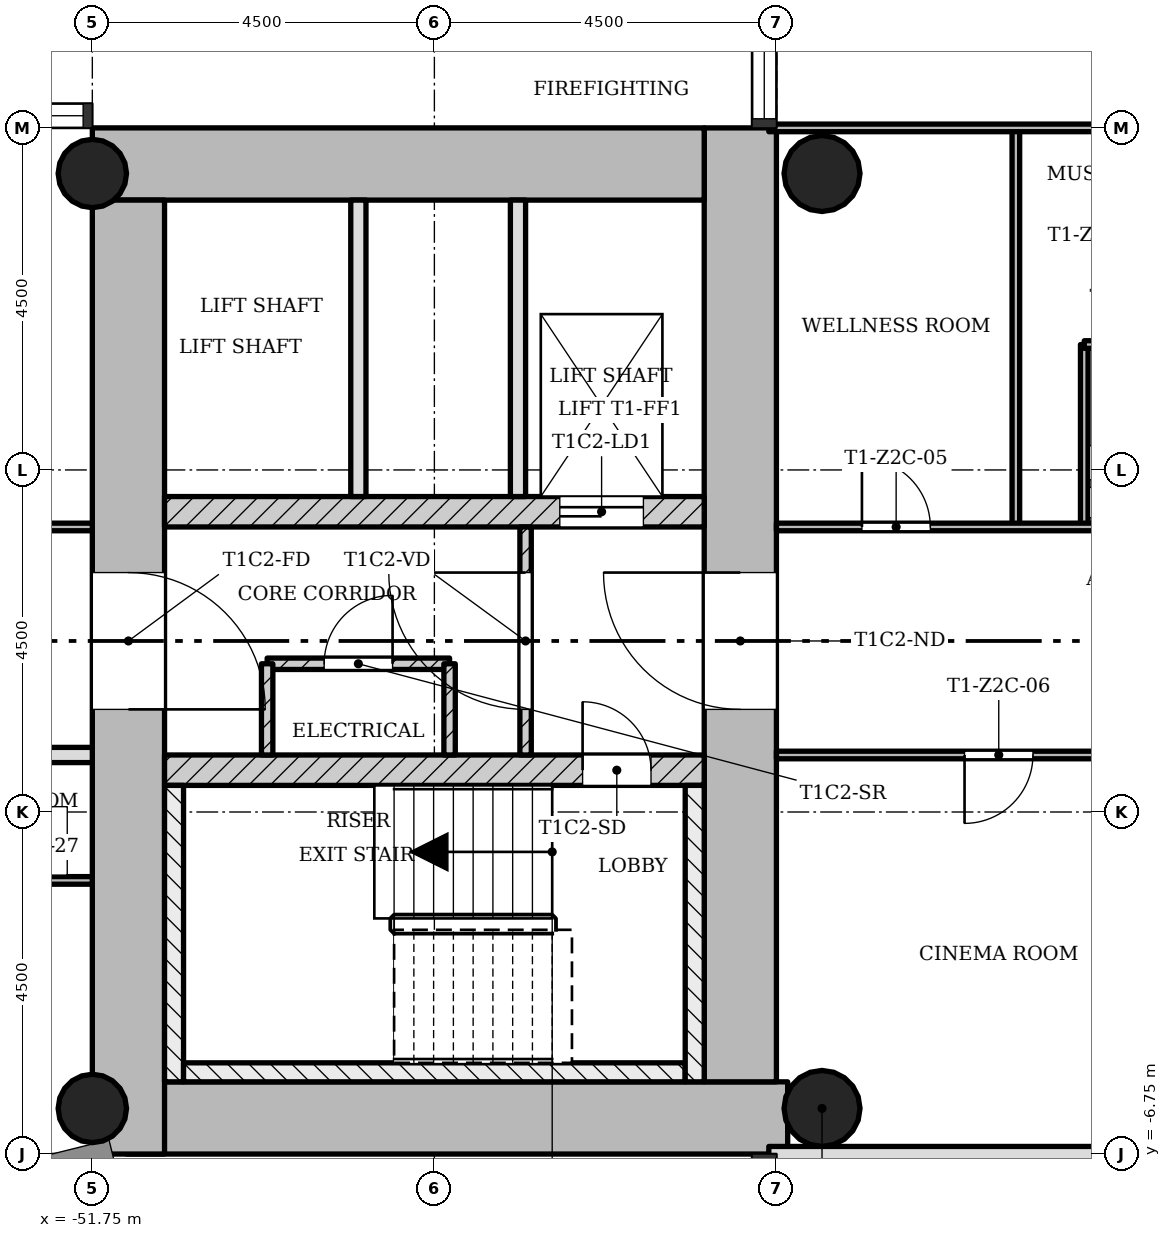
"""IFC4 building model, lengths in metres.
Left out: names, types, materials, properties, quantities, classifications, styles, units other than length and angle.
Written with IfcOpenShell. Run it as: python <this file> out.ifc"""

import sys

from ifc_helpers import new_model, si_unit, direction, frame, frame_2d, origin, origin_2d, place, context, subcontext, project, spatial, rectangle, hollow_circle, extrude, element, fill, save


model = new_model("IFC4")
c1 = context("Model", 3, precision=1e-05, world=origin(), true_north=direction((0.0, 1.0)))
c2 = subcontext(c1, "Body", "Model", "MODEL_VIEW")
j1 = project(units=[si_unit("LENGTHUNIT", "METRE"), si_unit("PLANEANGLEUNIT", "RADIAN")], contexts=[c1])
p1 = place(None, origin())
s1 = spatial("IfcSite", under=j1, at=p1, CompositionType="ELEMENT")
p2 = place(p1, origin())
s2 = spatial("IfcBuilding", under=s1, at=p2, CompositionType="ELEMENT")
p3 = place(p2, frame((0.0, 0.0, 93.6)))
s3 = spatial("IfcBuildingStorey", under=s2, at=p3, CompositionType="ELEMENT", Elevation=93.6)
p4 = place(p3, frame((-51.298, -6.275, 0.0), z_axis=(0.0, 0.0, 1.0), x_axis=(1.0, 0.0, 0.0)))
e1 = element("IfcWall", 1, at=p4, inside=s3, PredefinedType="SHEAR", context=c2, shape_type="SweptSolid", body=[
    extrude(rectangle(XDim=8.696, YDim=0.95, at=frame_2d((4.348, 0.0))), origin(), (0.0, 0.0, 1.0), 3.4),
])
p5 = place(p3, frame((-43.225, -5.8, 0.0), z_axis=(0.0, 0.0, 1.0), x_axis=(0.0, 1.0, 0.0)))
e2 = element("IfcWall", 2, at=p5, inside=s3, PredefinedType="SHEAR", context=c2, shape_type="SweptSolid", body=[
    extrude(rectangle(XDim=12.55, YDim=0.95, at=frame_2d((6.275, 0.0))), origin(), (0.0, 0.0, 1.0), 3.4),
])
p6 = place(p5, frame((4.9, 0.0, 0.0)))
e3 = element("IfcOpeningElement", 3, at=p6, cuts=e2, PredefinedType="OPENING", context=c2, shape_type="SweptSolid", body=[
    extrude(rectangle(XDim=1.8, YDim=2.1, at=frame_2d((0.9, 1.05))), frame((0.0, 0.485, 0.0), z_axis=(0.0, -1.0, 0.0), x_axis=(1.0, 0.0, 0.0)), (0.0, 0.0, 1.0), 0.97),
])
p7 = place(p3, frame((-43.7, 6.275, 0.0), z_axis=(0.0, 0.0, 1.0), x_axis=(-1.0, 0.0, 0.0)))
e4 = element("IfcWall", 4, at=p7, inside=s3, PredefinedType="SHEAR", context=c2, shape_type="SweptSolid", body=[
    extrude(rectangle(XDim=8.05, YDim=0.95, at=frame_2d((4.025, 0.0))), origin(), (0.0, 0.0, 1.0), 3.4),
])
p8 = place(p3, frame((-51.275, 5.8, 0.0), z_axis=(0.0, 0.0, 1.0), x_axis=(0.0, -1.0, 0.0)))
e5 = element("IfcWall", 5, at=p8, inside=s3, PredefinedType="SHEAR", context=c2, shape_type="SweptSolid", body=[
    extrude(rectangle(XDim=12.55, YDim=0.95, at=frame_2d((6.275, 0.0))), origin(), (0.0, 0.0, 1.0), 3.4),
])
p9 = place(p8, frame((4.9, 0.0, 0.0)))
e6 = element("IfcOpeningElement", 6, at=p9, cuts=e5, PredefinedType="OPENING", context=c2, shape_type="SweptSolid", body=[
    extrude(rectangle(XDim=1.8, YDim=2.1, at=frame_2d((0.9, 1.05))), frame((0.0, 0.485, 0.0), z_axis=(0.0, -1.0, 0.0), x_axis=(1.0, 0.0, 0.0)), (0.0, 0.0, 1.0), 0.97),
])
p10 = place(p3, frame((-50.8, -1.7, 0.0), z_axis=(0.0, 0.0, 1.0), x_axis=(1.0, 0.0, 0.0)))
e7 = element("IfcWall", 7, at=p10, inside=s3, PredefinedType="SHEAR", context=c2, shape_type="SweptSolid", body=[
    extrude(rectangle(XDim=7.1, YDim=0.4, at=frame_2d((3.55, 0.0))), origin(), (0.0, 0.0, 1.0), 3.4),
])
p11 = place(p10, frame((5.5, 0.0, 0.0)))
e8 = element("IfcOpeningElement", 8, at=p11, cuts=e7, PredefinedType="OPENING", context=c2, shape_type="SweptSolid", body=[
    extrude(rectangle(XDim=0.9, YDim=2.1, at=frame_2d((0.45, 1.05))), frame((0.0, 0.21, 0.0), z_axis=(0.0, -1.0, 0.0), x_axis=(1.0, 0.0, 0.0)), (0.0, 0.0, 1.0), 0.42),
])
p12 = place(p3, frame((-50.8, 1.7, 0.0), z_axis=(0.0, 0.0, 1.0), x_axis=(1.0, 0.0, 0.0)))
e9 = element("IfcWall", 9, at=p12, inside=s3, PredefinedType="SHEAR", context=c2, shape_type="SweptSolid", body=[
    extrude(rectangle(XDim=7.1, YDim=0.4, at=frame_2d((3.55, 0.0))), origin(), (0.0, 0.0, 1.0), 3.4),
])
p13 = place(p12, frame((5.2, 0.0, 0.0)))
e10 = element("IfcOpeningElement", 10, at=p13, cuts=e9, PredefinedType="OPENING", context=c2, shape_type="SweptSolid", body=[
    extrude(rectangle(XDim=1.1, YDim=2.1, at=frame_2d((0.55, 1.05))), frame((0.0, 0.21, 0.0), z_axis=(0.0, -1.0, 0.0), x_axis=(1.0, 0.0, 0.0)), (0.0, 0.0, 1.0), 0.42),
])
for number, where, z_axis, x_axis in (
    (11, (-51.75, -6.15, 0.0), (0.0, 0.0, 1.0), (1.0, 0.0, 0.0)),
    (12, (-51.75, 6.15, 0.0), (0.0, 0.0, 1.0), (1.0, 0.0, 0.0)),
):
    element("IfcColumn", number, at=place(p3, frame(where, z_axis=z_axis, x_axis=x_axis)), inside=s3, PredefinedType="COLUMN", context=c2, shape_type="SweptSolid", body=[
        extrude(hollow_circle(Radius=0.45, WallThickness=0.032, at=origin_2d()), origin(), (0.0, 0.0, 1.0), 3.4),
    ])
for number, where, z_axis, x_axis in (
    (13, (-42.15, -6.15, 0.0), (0.0, 0.0, 1.0), (1.0, 0.0, 0.0)),
    (14, (-42.15, 6.15, 0.0), (0.0, 0.0, 1.0), (1.0, 0.0, 0.0)),
):
    element("IfcColumn", number, at=place(p3, frame(where, z_axis=z_axis, x_axis=x_axis)), inside=s3, PredefinedType="COLUMN", context=c2, shape_type="SweptSolid", body=[
        extrude(hollow_circle(Radius=0.5, WallThickness=0.036, at=origin_2d()), origin(), (0.0, 0.0, 1.0), 3.4),
    ])
p14 = place(p3, frame((-46.05, 1.5, 0.0), z_axis=(0.0, 0.0, 1.0), x_axis=(0.0, -1.0, 0.0)))
e15 = element("IfcWall", 15, at=p14, inside=s3, PredefinedType="PARTITIONING", context=c2, shape_type="SweptSolid", body=[
    extrude(rectangle(XDim=3.0, YDim=0.15, at=frame_2d((1.5, 0.0))), origin(), (0.0, 0.0, 1.0), 3.0),
])
p15 = place(p14, frame((0.6, 0.0, 0.0)))
e16 = element("IfcOpeningElement", 16, at=p15, cuts=e15, PredefinedType="OPENING", context=c2, shape_type="SweptSolid", body=[
    extrude(rectangle(XDim=1.8, YDim=2.1, at=frame_2d((0.9, 1.05))), frame((0.0, 0.085, 0.0), z_axis=(0.0, -1.0, 0.0), x_axis=(1.0, 0.0, 0.0)), (0.0, 0.0, 1.0), 0.17),
])
for number, where, z_axis, x_axis in (
    (17, (-46.15, 5.8, 0.0), (0.0, 0.0, 1.0), (0.0, -1.0, 0.0)),
    (18, (-48.25, 5.8, 0.0), (0.0, 0.0, 1.0), (0.0, -1.0, 0.0)),
):
    element("IfcWall", number, at=place(p3, frame(where, z_axis=z_axis, x_axis=x_axis)), inside=s3, PredefinedType="SOLIDWALL", context=c2, shape_type="SweptSolid", body=[
        extrude(rectangle(XDim=3.9, YDim=0.2, at=frame_2d((1.95, 0.0))), origin(), (0.0, 0.0, 1.0), 3.0),
    ])
p16 = place(p3, frame((-47.05, -0.3, 0.0), z_axis=(0.0, 0.0, 1.0), x_axis=(-1.0, 0.0, 0.0)))
e19 = element("IfcWall", 19, at=p16, inside=s3, PredefinedType="PARTITIONING", context=c2, shape_type="SweptSolid", body=[
    extrude(rectangle(XDim=2.4, YDim=0.15, at=frame_2d((1.2, 0.0))), origin(), (0.0, 0.0, 1.0), 3.0),
])
p17 = place(p16, frame((0.75, 0.0, 0.0)))
e20 = element("IfcOpeningElement", 20, at=p17, cuts=e19, PredefinedType="OPENING", context=c2, shape_type="SweptSolid", body=[
    extrude(rectangle(XDim=0.9, YDim=2.1, at=frame_2d((0.45, 1.05))), frame((0.0, 0.085, 0.0), z_axis=(0.0, -1.0, 0.0), x_axis=(1.0, 0.0, 0.0)), (0.0, 0.0, 1.0), 0.17),
])
for number, where, z_axis, x_axis in (
    (21, (-47.05, -0.3, 0.0), (0.0, 0.0, 1.0), (0.0, -1.0, 0.0)),
    (22, (-49.45, -0.3, 0.0), (0.0, 0.0, 1.0), (0.0, -1.0, 0.0)),
):
    element("IfcWall", number, at=place(p3, frame(where, z_axis=z_axis, x_axis=x_axis)), inside=s3, PredefinedType="PARTITIONING", context=c2, shape_type="SweptSolid", body=[
        extrude(rectangle(XDim=1.2, YDim=0.15, at=frame_2d((0.6, 0.0))), origin(), (0.0, 0.0, 1.0), 3.0),
    ])
p18 = place(p3, frame((-39.6, 1.5, 0.0), z_axis=(0.0, 0.0, 1.0), x_axis=(0.0, 1.0, 0.0)))
e23 = element("IfcWall", 23, at=p18, inside=s3, PredefinedType="PARTITIONING", context=c2, shape_type="SweptSolid", body=[
    extrude(rectangle(XDim=5.25, YDim=0.1, at=frame_2d((2.625, 0.0))), origin(), (0.0, 0.0, 1.0), 3.0),
])
p19 = place(p3, frame((-38.7, 1.5, 0.0), z_axis=(0.0, 0.0, 1.0), x_axis=(0.0, 1.0, 0.0)))
e24 = element("IfcWall", 24, at=p19, inside=s3, PredefinedType="PARTITIONING", context=c2, shape_type="SweptSolid", body=[
    extrude(rectangle(XDim=2.4, YDim=0.1, at=frame_2d((1.2, 0.0))), origin(), (0.0, 0.0, 1.0), 3.0),
])
p20 = place(p3, frame((-42.85, -6.75, 0.0), z_axis=(0.0, 0.0, 1.0), x_axis=(1.0, 0.0, 0.0)))
e25 = element("IfcWall", 25, at=p20, inside=s3, PredefinedType="SOLIDWALL", context=c2, shape_type="SweptSolid", body=[
    extrude(rectangle(XDim=13.7, YDim=0.2, at=frame_2d((6.85, 0.0))), origin(), (0.0, 0.0, 1.0), 3.0),
])
p21 = place(p20, frame((6.4, 0.0, 0.0)))
e26 = element("IfcOpeningElement", 26, at=p21, cuts=e25, PredefinedType="OPENING", context=c2, shape_type="SweptSolid", body=[
    extrude(rectangle(XDim=0.9, YDim=2.1, at=frame_2d((0.45, 1.05))), frame((0.0, 0.11, 0.0), z_axis=(0.0, -1.0, 0.0), x_axis=(1.0, 0.0, 0.0)), (0.0, 0.0, 1.0), 0.22),
])
p22 = place(p3, frame((-56.25, -3.15, 0.0), z_axis=(0.0, 0.0, 1.0), x_axis=(1.0, 0.0, 0.0)))
e27 = element("IfcWall", 27, at=p22, inside=s3, PredefinedType="PARTITIONING", context=c2, shape_type="SweptSolid", body=[
    extrude(rectangle(XDim=4.5, YDim=0.1, at=frame_2d((2.25, 0.0))), origin(), (0.0, 0.0, 1.0), 3.0),
])
p23 = place(p22, frame((0.6, 0.0, 0.0)))
e28 = element("IfcOpeningElement", 28, at=p23, cuts=e27, PredefinedType="OPENING", context=c2, shape_type="SweptSolid", body=[
    extrude(rectangle(XDim=0.9, YDim=2.1, at=frame_2d((0.45, 1.05))), frame((0.0, 0.06, 0.0), z_axis=(0.0, -1.0, 0.0), x_axis=(1.0, 0.0, 0.0)), (0.0, 0.0, 1.0), 0.12),
])
p24 = place(p3, frame((-42.75, -1.5, 0.0), z_axis=(0.0, 0.0, 1.0), x_axis=(1.0, 0.0, 0.0)))
e29 = element("IfcWall", 29, at=p24, inside=s3, PredefinedType="PARTITIONING", context=c2, shape_type="SweptSolid", body=[
    extrude(rectangle(XDim=5.85, YDim=0.1, at=frame_2d((2.925, 0.0))), origin(), (0.0, 0.0, 1.0), 3.0),
])
p25 = place(p24, frame((2.475, 0.0, 0.0)))
e30 = element("IfcOpeningElement", 30, at=p25, cuts=e29, PredefinedType="OPENING", context=c2, shape_type="SweptSolid", body=[
    extrude(rectangle(XDim=0.9, YDim=2.1, at=frame_2d((0.45, 1.05))), frame((0.0, 0.06, 0.0), z_axis=(0.0, -1.0, 0.0), x_axis=(1.0, 0.0, 0.0)), (0.0, 0.0, 1.0), 0.12),
])
p26 = place(p3, frame((-56.25, -1.5, 0.0), z_axis=(0.0, 0.0, 1.0), x_axis=(1.0, 0.0, 0.0)))
e31 = element("IfcWall", 31, at=p26, inside=s3, PredefinedType="SOLIDWALL", context=c2, shape_type="SweptSolid", body=[
    extrude(rectangle(XDim=4.5, YDim=0.2, at=frame_2d((2.25, 0.0))), origin(), (0.0, 0.0, 1.0), 3.0),
])
p27 = place(p26, frame((0.6, 0.0, 0.0)))
e32 = element("IfcOpeningElement", 32, at=p27, cuts=e31, PredefinedType="OPENING", context=c2, shape_type="SweptSolid", body=[
    extrude(rectangle(XDim=0.9, YDim=2.1, at=frame_2d((0.45, 1.05))), frame((0.0, 0.11, 0.0), z_axis=(0.0, -1.0, 0.0), x_axis=(1.0, 0.0, 0.0)), (0.0, 0.0, 1.0), 0.22),
])
p28 = place(p3, frame((-56.25, 1.5, 0.0), z_axis=(0.0, 0.0, 1.0), x_axis=(1.0, 0.0, 0.0)))
e33 = element("IfcWall", 33, at=p28, inside=s3, PredefinedType="PARTITIONING", context=c2, shape_type="SweptSolid", body=[
    extrude(rectangle(XDim=4.5, YDim=0.1, at=frame_2d((2.25, 0.0))), origin(), (0.0, 0.0, 1.0), 3.0),
])
p29 = place(p28, frame((1.8, 0.0, 0.0)))
e34 = element("IfcOpeningElement", 34, at=p29, cuts=e33, PredefinedType="OPENING", context=c2, shape_type="SweptSolid", body=[
    extrude(rectangle(XDim=0.9, YDim=2.1, at=frame_2d((0.45, 1.05))), frame((0.0, 0.06, 0.0), z_axis=(0.0, -1.0, 0.0), x_axis=(1.0, 0.0, 0.0)), (0.0, 0.0, 1.0), 0.12),
])
p30 = place(p3, frame((-42.75, 1.5, 0.0), z_axis=(0.0, 0.0, 1.0), x_axis=(1.0, 0.0, 0.0)))
e35 = element("IfcWall", 35, at=p30, inside=s3, PredefinedType="PARTITIONING", context=c2, shape_type="SweptSolid", body=[
    extrude(rectangle(XDim=5.85, YDim=0.1, at=frame_2d((2.925, 0.0))), origin(), (0.0, 0.0, 1.0), 3.0),
])
p31 = place(p30, frame((1.125, 0.0, 0.0)))
e36 = element("IfcOpeningElement", 36, at=p31, cuts=e35, PredefinedType="OPENING", context=c2, shape_type="SweptSolid", body=[
    extrude(rectangle(XDim=0.9, YDim=2.1, at=frame_2d((0.45, 1.05))), frame((0.0, 0.06, 0.0), z_axis=(0.0, -1.0, 0.0), x_axis=(1.0, 0.0, 0.0)), (0.0, 0.0, 1.0), 0.12),
])
p32 = place(p3, frame((-38.7, 3.9, 0.0), z_axis=(0.0, 0.0, 1.0), x_axis=(1.0, 0.0, 0.0)))
e37 = element("IfcWall", 37, at=p32, inside=s3, PredefinedType="PARTITIONING", context=c2, shape_type="SweptSolid", body=[
    extrude(rectangle(XDim=1.8, YDim=0.1, at=frame_2d((0.9, 0.0))), origin(), (0.0, 0.0, 1.0), 3.0),
])
p33 = place(p3, frame((-42.85, 6.75, 0.0), z_axis=(0.0, 0.0, 1.0), x_axis=(1.0, 0.0, 0.0)))
e38 = element("IfcWall", 38, at=p33, inside=s3, PredefinedType="PARTITIONING", context=c2, shape_type="SweptSolid", body=[
    extrude(rectangle(XDim=5.95, YDim=0.1, at=frame_2d((2.975, 0.0))), origin(), (0.0, 0.0, 1.0), 3.0),
])
p34 = place(p3, frame((-50.675, -1.9, 0.0), z_axis=(0.0, 0.0, 1.0), x_axis=(0.0, -1.0, 0.0)))
e39 = element("IfcWall", 39, at=p34, inside=s3, PredefinedType="SHEAR", context=c2, shape_type="SweptSolid", body=[
    extrude(rectangle(XDim=3.9, YDim=0.25, at=frame_2d((1.95, 0.0))), origin(), (0.0, 0.0, 1.0), 3.4),
])
p35 = place(p3, frame((-43.95, -5.675, 0.0), z_axis=(0.0, 0.0, 1.0), x_axis=(-1.0, 0.0, 0.0)))
e40 = element("IfcWall", 40, at=p35, inside=s3, PredefinedType="SHEAR", context=c2, shape_type="SweptSolid", body=[
    extrude(rectangle(XDim=6.6, YDim=0.25, at=frame_2d((3.3, 0.0))), origin(), (0.0, 0.0, 1.0), 3.4),
])
p36 = place(p3, frame((-43.825, -1.9, 0.0), z_axis=(0.0, 0.0, 1.0), x_axis=(0.0, -1.0, 0.0)))
e41 = element("IfcWall", 41, at=p36, inside=s3, PredefinedType="SHEAR", context=c2, shape_type="SweptSolid", body=[
    extrude(rectangle(XDim=3.9, YDim=0.25, at=frame_2d((1.95, 0.0))), origin(), (0.0, 0.0, 1.0), 3.4),
])
p37 = place(p15, origin())
e42 = element("IfcDoor", 42, at=p37, inside=s3, OperationType="SINGLE_SWING_LEFT", PredefinedType="DOOR", context=c2, shape_type="SweptSolid", body=[
    extrude(rectangle(XDim=1.8, YDim=2.1, at=frame_2d((0.9, 1.05))), frame((0.0, 0.025, 0.0), z_axis=(0.0, -1.0, 0.0), x_axis=(1.0, 0.0, 0.0)), (0.0, 0.0, 1.0), 0.05),
])
fill(e16, e42)
p38 = place(p17, origin())
e43 = element("IfcDoor", 43, at=p38, inside=s3, OperationType="SINGLE_SWING_LEFT", PredefinedType="DOOR", context=c2, shape_type="SweptSolid", body=[
    extrude(rectangle(XDim=0.9, YDim=2.1, at=frame_2d((0.45, 1.05))), frame((0.0, 0.025, 0.0), z_axis=(0.0, -1.0, 0.0), x_axis=(1.0, 0.0, 0.0)), (0.0, 0.0, 1.0), 0.05),
])
fill(e20, e43)
p39 = place(p31, origin())
e44 = element("IfcDoor", 44, at=p39, inside=s3, OperationType="SINGLE_SWING_RIGHT", PredefinedType="DOOR", context=c2, shape_type="SweptSolid", body=[
    extrude(rectangle(XDim=0.9, YDim=2.1, at=frame_2d((0.45, 1.05))), frame((0.0, 0.025, 0.0), z_axis=(0.0, -1.0, 0.0), x_axis=(1.0, 0.0, 0.0)), (0.0, 0.0, 1.0), 0.05),
])
fill(e36, e44)
p40 = place(p25, origin())
e45 = element("IfcDoor", 45, at=p40, inside=s3, OperationType="SINGLE_SWING_LEFT", PredefinedType="DOOR", context=c2, shape_type="SweptSolid", body=[
    extrude(rectangle(XDim=0.9, YDim=2.1, at=frame_2d((0.45, 1.05))), frame((0.0, 0.025, 0.0), z_axis=(0.0, -1.0, 0.0), x_axis=(1.0, 0.0, 0.0)), (0.0, 0.0, 1.0), 0.05),
])
fill(e30, e45)
p41 = place(p11, origin())
e46 = element("IfcDoor", 46, at=p41, inside=s3, OperationType="SINGLE_SWING_RIGHT", PredefinedType="DOOR", context=c2, shape_type="SweptSolid", body=[
    extrude(rectangle(XDim=0.9, YDim=2.1, at=frame_2d((0.45, 1.05))), frame((0.0, 0.025, 0.0), z_axis=(0.0, -1.0, 0.0), x_axis=(1.0, 0.0, 0.0)), (0.0, 0.0, 1.0), 0.05),
])
fill(e8, e46)
p42 = place(p13, origin())
e47 = element("IfcDoor", 47, at=p42, inside=s3, OperationType="SLIDING_TO_LEFT", PredefinedType="DOOR", context=c2, shape_type="SweptSolid", body=[
    extrude(rectangle(XDim=1.1, YDim=2.1, at=frame_2d((0.55, 1.05))), frame((0.0, 0.025, 0.0), z_axis=(0.0, -1.0, 0.0), x_axis=(1.0, 0.0, 0.0)), (0.0, 0.0, 1.0), 0.05),
])
fill(e10, e47)
p43 = place(p6, origin())
e48 = element("IfcDoor", 48, at=p43, inside=s3, OperationType="SINGLE_SWING_LEFT", PredefinedType="DOOR", context=c2, shape_type="SweptSolid", body=[
    extrude(rectangle(XDim=1.8, YDim=2.1, at=frame_2d((0.9, 1.05))), frame((0.0, 0.025, 0.0), z_axis=(0.0, -1.0, 0.0), x_axis=(1.0, 0.0, 0.0)), (0.0, 0.0, 1.0), 0.05),
])
fill(e3, e48)
p44 = place(p9, origin())
e49 = element("IfcDoor", 49, at=p44, inside=s3, OperationType="SINGLE_SWING_LEFT", PredefinedType="DOOR", context=c2, shape_type="SweptSolid", body=[
    extrude(rectangle(XDim=1.8, YDim=2.1, at=frame_2d((0.9, 1.05))), frame((0.0, 0.025, 0.0), z_axis=(0.0, -1.0, 0.0), x_axis=(1.0, 0.0, 0.0)), (0.0, 0.0, 1.0), 0.05),
])
fill(e6, e49)
save(model, sys.argv[1])
